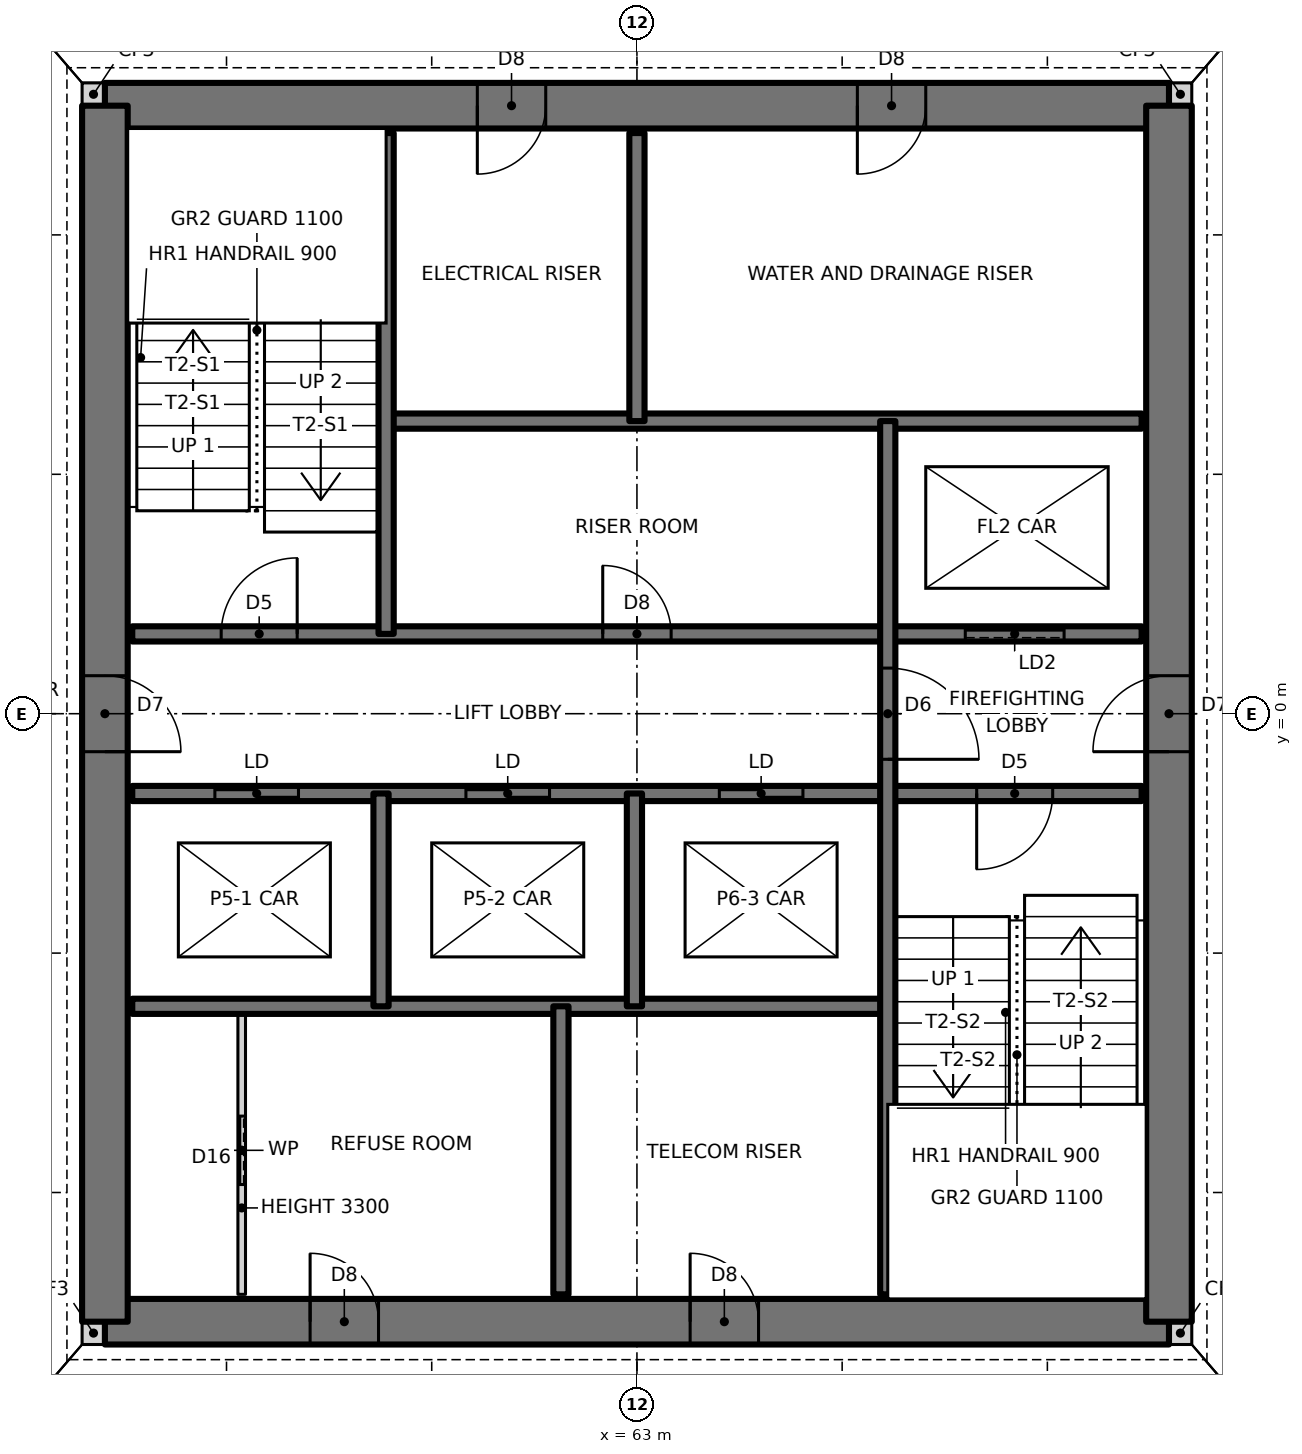
"""IFC4 building model, lengths in metres.
Left out: names, types, materials, properties, quantities, classifications, styles, units other than length and angle.
Written with IfcOpenShell. Run it as: python <this file> out.ifc"""

import sys

from ifc_helpers import new_model, si_unit, direction, frame, frame_2d, origin, place, context, subcontext, project, spatial, rectangle, extrude, element, fill, save


model = new_model("IFC4")
c1 = context("Model", 3, precision=1e-05, world=origin(), true_north=direction((0.0, 1.0)))
c2 = subcontext(c1, "Body", "Model", "MODEL_VIEW")
j1 = project(units=[si_unit("LENGTHUNIT", "METRE"), si_unit("PLANEANGLEUNIT", "RADIAN")], contexts=[c1])
p1 = place(None, origin())
s1 = spatial("IfcSite", under=j1, at=p1, CompositionType="ELEMENT")
p2 = place(p1, origin())
s2 = spatial("IfcBuilding", under=s1, at=p2, CompositionType="ELEMENT")
p3 = place(p2, frame((0.0, 0.0, 64.0)))
s3 = spatial("IfcBuildingStorey", under=s2, at=p3, CompositionType="ELEMENT", Elevation=64.0)
for number, where, z_axis, x_axis in (
    (1, (55.7, -8.15, 0.0), (0.0, 0.0, 1.0), (1.0, 0.0, 0.0)),
    (2, (70.0, -8.15, 0.0), (0.0, 0.0, 1.0), (1.0, 0.0, 0.0)),
    (3, (70.0, 8.15, 0.0), (0.0, 0.0, 1.0), (1.0, 0.0, 0.0)),
    (4, (55.7, 8.15, 0.0), (0.0, 0.0, 1.0), (1.0, 0.0, 0.0)),
):
    element("IfcWall", number, at=place(p3, frame(where, z_axis=z_axis, x_axis=x_axis)), inside=s3, PredefinedType="SOLIDWALL", context=c2, shape_type="SweptSolid", body=[
        extrude(rectangle(XDim=0.3, YDim=0.3, at=frame_2d((0.15, 0.0))), origin(), (0.0, 0.0, 1.0), 3.5),
    ])
p4 = place(p3, frame((56.0, -8.0, 0.0), z_axis=(0.0, 0.0, 1.0), x_axis=(1.0, 0.0, 0.0)))
e5 = element("IfcWall", 5, at=p4, inside=s3, PredefinedType="SHEAR", context=c2, shape_type="SweptSolid", body=[
    extrude(rectangle(XDim=14.0, YDim=0.6, at=frame_2d((7.0, 0.0))), origin(), (0.0, 0.0, 1.0), 3.5),
])
p5 = place(p4, frame((2.7, 0.0, 0.0)))
e6 = element("IfcOpeningElement", 6, at=p5, cuts=e5, PredefinedType="OPENING", context=c2, shape_type="SweptSolid", body=[
    extrude(rectangle(XDim=0.9, YDim=2.1, at=frame_2d((0.45, 1.05))), frame((0.0, 0.31, 0.0), z_axis=(0.0, -1.0, 0.0), x_axis=(1.0, 0.0, 0.0)), (0.0, 0.0, 1.0), 0.62),
])
p6 = place(p4, frame((7.7, 0.0, 0.0)))
e7 = element("IfcOpeningElement", 7, at=p6, cuts=e5, PredefinedType="OPENING", context=c2, shape_type="SweptSolid", body=[
    extrude(rectangle(XDim=0.9, YDim=2.1, at=frame_2d((0.45, 1.05))), frame((0.0, 0.31, 0.0), z_axis=(0.0, -1.0, 0.0), x_axis=(1.0, 0.0, 0.0)), (0.0, 0.0, 1.0), 0.62),
])
p7 = place(p3, frame((70.0, 8.0, 0.0), z_axis=(0.0, 0.0, 1.0), x_axis=(-1.0, 0.0, 0.0)))
e8 = element("IfcWall", 8, at=p7, inside=s3, PredefinedType="SHEAR", context=c2, shape_type="SweptSolid", body=[
    extrude(rectangle(XDim=14.0, YDim=0.6, at=frame_2d((7.0, 0.0))), origin(), (0.0, 0.0, 1.0), 3.5),
])
p8 = place(p7, frame((8.2, 0.0, 0.0)))
e9 = element("IfcOpeningElement", 9, at=p8, cuts=e8, PredefinedType="OPENING", context=c2, shape_type="SweptSolid", body=[
    extrude(rectangle(XDim=0.9, YDim=2.1, at=frame_2d((0.45, 1.05))), frame((0.0, 0.31, 0.0), z_axis=(0.0, -1.0, 0.0), x_axis=(1.0, 0.0, 0.0)), (0.0, 0.0, 1.0), 0.62),
])
p9 = place(p7, frame((3.2, 0.0, 0.0)))
e10 = element("IfcOpeningElement", 10, at=p9, cuts=e8, PredefinedType="OPENING", context=c2, shape_type="SweptSolid", body=[
    extrude(rectangle(XDim=0.9, YDim=2.1, at=frame_2d((0.45, 1.05))), frame((0.0, 0.31, 0.0), z_axis=(0.0, -1.0, 0.0), x_axis=(1.0, 0.0, 0.0)), (0.0, 0.0, 1.0), 0.62),
])
p10 = place(p3, frame((70.0, -8.0, 0.0), z_axis=(0.0, 0.0, 1.0), x_axis=(0.0, 1.0, 0.0)))
e11 = element("IfcWall", 11, at=p10, inside=s3, PredefinedType="SHEAR", context=c2, shape_type="SweptSolid", body=[
    extrude(rectangle(XDim=16.0, YDim=0.6, at=frame_2d((8.0, 0.0))), origin(), (0.0, 0.0, 1.0), 3.5),
])
p11 = place(p10, frame((7.5, 0.0, 0.0)))
e12 = element("IfcOpeningElement", 12, at=p11, cuts=e11, PredefinedType="OPENING", context=c2, shape_type="SweptSolid", body=[
    extrude(rectangle(XDim=1.0, YDim=2.1, at=frame_2d((0.5, 1.05))), frame((0.0, 0.31, 0.0), z_axis=(0.0, -1.0, 0.0), x_axis=(1.0, 0.0, 0.0)), (0.0, 0.0, 1.0), 0.62),
])
p12 = place(p3, frame((56.0, 8.0, 0.0), z_axis=(0.0, 0.0, 1.0), x_axis=(0.0, -1.0, 0.0)))
e13 = element("IfcWall", 13, at=p12, inside=s3, PredefinedType="SHEAR", context=c2, shape_type="SweptSolid", body=[
    extrude(rectangle(XDim=16.0, YDim=0.6, at=frame_2d((8.0, 0.0))), origin(), (0.0, 0.0, 1.0), 3.5),
])
p13 = place(p12, frame((7.5, 0.0, 0.0)))
e14 = element("IfcOpeningElement", 14, at=p13, cuts=e13, PredefinedType="OPENING", context=c2, shape_type="SweptSolid", body=[
    extrude(rectangle(XDim=1.0, YDim=2.1, at=frame_2d((0.5, 1.05))), frame((0.0, 0.31, 0.0), z_axis=(0.0, -1.0, 0.0), x_axis=(1.0, 0.0, 0.0)), (0.0, 0.0, 1.0), 0.62),
])
p14 = place(p3, frame((56.36, -3.85, 0.0), z_axis=(0.0, 0.0, 1.0), x_axis=(1.0, 0.0, 0.0)))
e15 = element("IfcWall", 15, at=p14, inside=s3, PredefinedType="SOLIDWALL", context=c2, shape_type="SweptSolid", body=[
    extrude(rectangle(XDim=9.94, YDim=0.2, at=frame_2d((4.97, 0.0))), origin(), (0.0, 0.0, 1.0), 3.5),
])
p15 = place(p3, frame((56.36, -1.05, 0.0), z_axis=(0.0, 0.0, 1.0), x_axis=(1.0, 0.0, 0.0)))
e16 = element("IfcWall", 16, at=p15, inside=s3, PredefinedType="SOLIDWALL", context=c2, shape_type="SweptSolid", body=[
    extrude(rectangle(XDim=13.28, YDim=0.2, at=frame_2d((6.64, 0.0))), origin(), (0.0, 0.0, 1.0), 3.5),
])
p16 = place(p15, frame((11.11, 0.0, 0.0)))
e17 = element("IfcOpeningElement", 17, at=p16, cuts=e16, PredefinedType="OPENING", context=c2, shape_type="SweptSolid", body=[
    extrude(rectangle(XDim=1.0, YDim=2.1, at=frame_2d((0.5, 1.05))), frame((0.0, 0.11, 0.0), z_axis=(0.0, -1.0, 0.0), x_axis=(1.0, 0.0, 0.0)), (0.0, 0.0, 1.0), 0.22),
])
p17 = place(p15, frame((1.087, 0.0, 0.0)))
e18 = element("IfcOpeningElement", 18, at=p17, cuts=e16, PredefinedType="OPENING", context=c2, shape_type="SweptSolid", body=[
    extrude(rectangle(XDim=1.1, YDim=2.1, at=frame_2d((0.55, 1.05))), frame((0.0, 0.11, 0.0), z_axis=(0.0, -1.0, 0.0), x_axis=(1.0, 0.0, 0.0)), (0.0, 0.0, 1.0), 0.22),
])
p18 = place(p15, frame((4.39, 0.0, 0.0)))
e19 = element("IfcOpeningElement", 19, at=p18, cuts=e16, PredefinedType="OPENING", context=c2, shape_type="SweptSolid", body=[
    extrude(rectangle(XDim=1.1, YDim=2.1, at=frame_2d((0.55, 1.05))), frame((0.0, 0.11, 0.0), z_axis=(0.0, -1.0, 0.0), x_axis=(1.0, 0.0, 0.0)), (0.0, 0.0, 1.0), 0.22),
])
p19 = place(p15, frame((7.724, 0.0, 0.0)))
e20 = element("IfcOpeningElement", 20, at=p19, cuts=e16, PredefinedType="OPENING", context=c2, shape_type="SweptSolid", body=[
    extrude(rectangle(XDim=1.1, YDim=2.1, at=frame_2d((0.55, 1.05))), frame((0.0, 0.11, 0.0), z_axis=(0.0, -1.0, 0.0), x_axis=(1.0, 0.0, 0.0)), (0.0, 0.0, 1.0), 0.22),
])
p20 = place(p3, frame((56.36, 1.05, 0.0), z_axis=(0.0, 0.0, 1.0), x_axis=(1.0, 0.0, 0.0)))
e21 = element("IfcWall", 21, at=p20, inside=s3, PredefinedType="SOLIDWALL", context=c2, shape_type="SweptSolid", body=[
    extrude(rectangle(XDim=13.28, YDim=0.2, at=frame_2d((6.64, 0.0))), origin(), (0.0, 0.0, 1.0), 3.5),
])
p21 = place(p20, frame((1.17, 0.0, 0.0)))
e22 = element("IfcOpeningElement", 22, at=p21, cuts=e21, PredefinedType="OPENING", context=c2, shape_type="SweptSolid", body=[
    extrude(rectangle(XDim=1.0, YDim=2.1, at=frame_2d((0.5, 1.05))), frame((0.0, 0.11, 0.0), z_axis=(0.0, -1.0, 0.0), x_axis=(1.0, 0.0, 0.0)), (0.0, 0.0, 1.0), 0.22),
])
p22 = place(p20, frame((6.19, 0.0, 0.0)))
e23 = element("IfcOpeningElement", 23, at=p22, cuts=e21, PredefinedType="OPENING", context=c2, shape_type="SweptSolid", body=[
    extrude(rectangle(XDim=0.9, YDim=2.1, at=frame_2d((0.45, 1.05))), frame((0.0, 0.11, 0.0), z_axis=(0.0, -1.0, 0.0), x_axis=(1.0, 0.0, 0.0)), (0.0, 0.0, 1.0), 0.22),
])
p23 = place(p20, frame((10.96, 0.0, 0.0)))
e24 = element("IfcOpeningElement", 24, at=p23, cuts=e21, PredefinedType="OPENING", context=c2, shape_type="SweptSolid", body=[
    extrude(rectangle(XDim=1.3, YDim=2.1, at=frame_2d((0.65, 1.05))), frame((0.0, 0.11, 0.0), z_axis=(0.0, -1.0, 0.0), x_axis=(1.0, 0.0, 0.0)), (0.0, 0.0, 1.0), 0.22),
])
p24 = place(p3, frame((59.7, 3.85, 0.0), z_axis=(0.0, 0.0, 1.0), x_axis=(1.0, 0.0, 0.0)))
e25 = element("IfcWall", 25, at=p24, inside=s3, PredefinedType="SOLIDWALL", context=c2, shape_type="SweptSolid", body=[
    extrude(rectangle(XDim=9.94, YDim=0.2, at=frame_2d((4.97, 0.0))), origin(), (0.0, 0.0, 1.0), 3.5),
])
p25 = place(p3, frame((66.3, -7.64, 0.0), z_axis=(0.0, 0.0, 1.0), x_axis=(0.0, 1.0, 0.0)))
e26 = element("IfcWall", 26, at=p25, inside=s3, PredefinedType="SOLIDWALL", context=c2, shape_type="SweptSolid", body=[
    extrude(rectangle(XDim=11.49, YDim=0.2, at=frame_2d((5.745, 0.0))), origin(), (0.0, 0.0, 1.0), 3.5),
])
p26 = place(p25, frame((7.04, 0.0, 0.0)))
e27 = element("IfcOpeningElement", 27, at=p26, cuts=e26, PredefinedType="OPENING", context=c2, shape_type="SweptSolid", body=[
    extrude(rectangle(XDim=1.2, YDim=2.1, at=frame_2d((0.6, 1.05))), frame((0.0, 0.11, 0.0), z_axis=(0.0, -1.0, 0.0), x_axis=(1.0, 0.0, 0.0)), (0.0, 0.0, 1.0), 0.22),
])
p27 = place(p3, frame((63.0, 3.85, 0.0), z_axis=(0.0, 0.0, 1.0), x_axis=(0.0, 1.0, 0.0)))
e28 = element("IfcWall", 28, at=p27, inside=s3, PredefinedType="SOLIDWALL", context=c2, shape_type="SweptSolid", body=[
    extrude(rectangle(XDim=3.79, YDim=0.2, at=frame_2d((1.895, 0.0))), origin(), (0.0, 0.0, 1.0), 3.5),
])
p28 = place(p3, frame((62.967, -3.85, 0.0), z_axis=(0.0, 0.0, 1.0), x_axis=(0.0, 1.0, 0.0)))
e29 = element("IfcWall", 29, at=p28, inside=s3, PredefinedType="SOLIDWALL", context=c2, shape_type="SweptSolid", body=[
    extrude(rectangle(XDim=2.8, YDim=0.2, at=frame_2d((1.4, 0.0))), origin(), (0.0, 0.0, 1.0), 3.5),
])
p29 = place(p3, frame((62.0, -7.64, 0.0), z_axis=(0.0, 0.0, 1.0), x_axis=(0.0, 1.0, 0.0)))
e30 = element("IfcWall", 30, at=p29, inside=s3, PredefinedType="SOLIDWALL", context=c2, shape_type="SweptSolid", body=[
    extrude(rectangle(XDim=3.79, YDim=0.2, at=frame_2d((1.895, 0.0))), origin(), (0.0, 0.0, 1.0), 3.5),
])
p30 = place(p3, frame((59.7, 1.05, 0.0), z_axis=(0.0, 0.0, 1.0), x_axis=(0.0, 1.0, 0.0)))
e31 = element("IfcWall", 31, at=p30, inside=s3, PredefinedType="SOLIDWALL", context=c2, shape_type="SweptSolid", body=[
    extrude(rectangle(XDim=6.59, YDim=0.2, at=frame_2d((3.295, 0.0))), origin(), (0.0, 0.0, 1.0), 3.5),
])
p31 = place(p3, frame((59.633, -3.85, 0.0), z_axis=(0.0, 0.0, 1.0), x_axis=(0.0, 1.0, 0.0)))
e32 = element("IfcWall", 32, at=p31, inside=s3, PredefinedType="SOLIDWALL", context=c2, shape_type="SweptSolid", body=[
    extrude(rectangle(XDim=2.8, YDim=0.2, at=frame_2d((1.4, 0.0))), origin(), (0.0, 0.0, 1.0), 3.5),
])
p32 = place(p3, frame((57.8, -7.64, 0.0), z_axis=(0.0, 0.0, 1.0), x_axis=(0.0, 1.0, 0.0)))
e33 = element("IfcWall", 33, at=p32, inside=s3, PredefinedType="PARTITIONING", context=c2, shape_type="SweptSolid", body=[
    extrude(rectangle(XDim=3.79, YDim=0.1, at=frame_2d((1.895, 0.0))), origin(), (0.0, 0.0, 1.0), 3.3),
])
p33 = place(p32, frame((1.445, 0.0, 0.0)))
e34 = element("IfcOpeningElement", 34, at=p33, cuts=e33, PredefinedType="OPENING", context=c2, shape_type="SweptSolid", body=[
    extrude(rectangle(XDim=0.9, YDim=2.1, at=frame_2d((0.45, 1.05))), frame((0.0, 0.06, 0.0), z_axis=(0.0, -1.0, 0.0), x_axis=(1.0, 0.0, 0.0)), (0.0, 0.0, 1.0), 0.12),
])
p34 = place(p21, origin())
e35 = element("IfcDoor", 35, at=p34, inside=s3, OperationType="SINGLE_SWING_RIGHT", PredefinedType="DOOR", context=c2, shape_type="SweptSolid", body=[
    extrude(rectangle(XDim=1.0, YDim=2.1, at=frame_2d((0.5, 1.05))), frame((0.0, 0.025, 0.0), z_axis=(0.0, -1.0, 0.0), x_axis=(1.0, 0.0, 0.0)), (0.0, 0.0, 1.0), 0.05),
])
fill(e22, e35)
p35 = place(p16, frame((1.0, 0.0, 0.0), z_axis=(0.0, 0.0, 1.0), x_axis=(-1.0, 0.0, 0.0)))
e36 = element("IfcDoor", 36, at=p35, inside=s3, OperationType="SINGLE_SWING_RIGHT", PredefinedType="DOOR", context=c2, shape_type="SweptSolid", body=[
    extrude(rectangle(XDim=1.0, YDim=2.1, at=frame_2d((0.5, 1.05))), frame((0.0, 0.025, 0.0), z_axis=(0.0, -1.0, 0.0), x_axis=(1.0, 0.0, 0.0)), (0.0, 0.0, 1.0), 0.05),
])
fill(e17, e36)
p36 = place(p26, frame((1.2, 0.0, 0.0), z_axis=(0.0, 0.0, 1.0), x_axis=(-1.0, 0.0, 0.0)))
e37 = element("IfcDoor", 37, at=p36, inside=s3, OperationType="SINGLE_SWING_RIGHT", PredefinedType="DOOR", context=c2, shape_type="SweptSolid", body=[
    extrude(rectangle(XDim=1.2, YDim=2.1, at=frame_2d((0.6, 1.05))), frame((0.0, 0.025, 0.0), z_axis=(0.0, -1.0, 0.0), x_axis=(1.0, 0.0, 0.0)), (0.0, 0.0, 1.0), 0.05),
])
fill(e27, e37)
p37 = place(p22, origin())
e38 = element("IfcDoor", 38, at=p37, inside=s3, OperationType="SINGLE_SWING_LEFT", PredefinedType="DOOR", context=c2, shape_type="SweptSolid", body=[
    extrude(rectangle(XDim=0.9, YDim=2.1, at=frame_2d((0.45, 1.05))), frame((0.0, 0.025, 0.0), z_axis=(0.0, -1.0, 0.0), x_axis=(1.0, 0.0, 0.0)), (0.0, 0.0, 1.0), 0.05),
])
fill(e23, e38)
p38 = place(p33, origin())
e39 = element("IfcDoor", 39, at=p38, inside=s3, OperationType="SLIDING_TO_LEFT", PredefinedType="DOOR", context=c2, shape_type="SweptSolid", body=[
    extrude(rectangle(XDim=0.9, YDim=2.1, at=frame_2d((0.45, 1.05))), frame((0.0, 0.025, 0.0), z_axis=(0.0, -1.0, 0.0), x_axis=(1.0, 0.0, 0.0)), (0.0, 0.0, 1.0), 0.05),
])
fill(e34, e39)
p39 = place(p13, origin())
e40 = element("IfcDoor", 40, at=p39, inside=s3, OperationType="SINGLE_SWING_RIGHT", PredefinedType="DOOR", context=c2, shape_type="SweptSolid", body=[
    extrude(rectangle(XDim=1.0, YDim=2.1, at=frame_2d((0.5, 1.05))), frame((0.0, 0.025, 0.0), z_axis=(0.0, -1.0, 0.0), x_axis=(1.0, 0.0, 0.0)), (0.0, 0.0, 1.0), 0.05),
])
fill(e14, e40)
p40 = place(p11, origin())
e41 = element("IfcDoor", 41, at=p40, inside=s3, OperationType="SINGLE_SWING_LEFT", PredefinedType="DOOR", context=c2, shape_type="SweptSolid", body=[
    extrude(rectangle(XDim=1.0, YDim=2.1, at=frame_2d((0.5, 1.05))), frame((0.0, 0.025, 0.0), z_axis=(0.0, -1.0, 0.0), x_axis=(1.0, 0.0, 0.0)), (0.0, 0.0, 1.0), 0.05),
])
fill(e12, e41)
p41 = place(p8, origin())
e42 = element("IfcDoor", 42, at=p41, inside=s3, OperationType="SINGLE_SWING_RIGHT", PredefinedType="DOOR", context=c2, shape_type="SweptSolid", body=[
    extrude(rectangle(XDim=0.9, YDim=2.1, at=frame_2d((0.45, 1.05))), frame((0.0, 0.025, 0.0), z_axis=(0.0, -1.0, 0.0), x_axis=(1.0, 0.0, 0.0)), (0.0, 0.0, 1.0), 0.05),
])
fill(e9, e42)
p42 = place(p9, origin())
e43 = element("IfcDoor", 43, at=p42, inside=s3, OperationType="SINGLE_SWING_RIGHT", PredefinedType="DOOR", context=c2, shape_type="SweptSolid", body=[
    extrude(rectangle(XDim=0.9, YDim=2.1, at=frame_2d((0.45, 1.05))), frame((0.0, 0.025, 0.0), z_axis=(0.0, -1.0, 0.0), x_axis=(1.0, 0.0, 0.0)), (0.0, 0.0, 1.0), 0.05),
])
fill(e10, e43)
p43 = place(p5, origin())
e44 = element("IfcDoor", 44, at=p43, inside=s3, OperationType="SINGLE_SWING_LEFT", PredefinedType="DOOR", context=c2, shape_type="SweptSolid", body=[
    extrude(rectangle(XDim=0.9, YDim=2.1, at=frame_2d((0.45, 1.05))), frame((0.0, 0.025, 0.0), z_axis=(0.0, -1.0, 0.0), x_axis=(1.0, 0.0, 0.0)), (0.0, 0.0, 1.0), 0.05),
])
fill(e6, e44)
p44 = place(p6, origin())
e45 = element("IfcDoor", 45, at=p44, inside=s3, OperationType="SINGLE_SWING_LEFT", PredefinedType="DOOR", context=c2, shape_type="SweptSolid", body=[
    extrude(rectangle(XDim=0.9, YDim=2.1, at=frame_2d((0.45, 1.05))), frame((0.0, 0.025, 0.0), z_axis=(0.0, -1.0, 0.0), x_axis=(1.0, 0.0, 0.0)), (0.0, 0.0, 1.0), 0.05),
])
fill(e7, e45)
p45 = place(p17, origin())
e46 = element("IfcDoor", 46, at=p45, inside=s3, OperationType="DOUBLE_DOOR_SLIDING", PredefinedType="DOOR", context=c2, shape_type="SweptSolid", body=[
    extrude(rectangle(XDim=1.1, YDim=2.1, at=frame_2d((0.55, 1.05))), frame((0.0, 0.025, 0.0), z_axis=(0.0, -1.0, 0.0), x_axis=(1.0, 0.0, 0.0)), (0.0, 0.0, 1.0), 0.05),
])
fill(e18, e46)
p46 = place(p18, origin())
e47 = element("IfcDoor", 47, at=p46, inside=s3, OperationType="DOUBLE_DOOR_SLIDING", PredefinedType="DOOR", context=c2, shape_type="SweptSolid", body=[
    extrude(rectangle(XDim=1.1, YDim=2.1, at=frame_2d((0.55, 1.05))), frame((0.0, 0.025, 0.0), z_axis=(0.0, -1.0, 0.0), x_axis=(1.0, 0.0, 0.0)), (0.0, 0.0, 1.0), 0.05),
])
fill(e19, e47)
p47 = place(p19, origin())
e48 = element("IfcDoor", 48, at=p47, inside=s3, OperationType="DOUBLE_DOOR_SLIDING", PredefinedType="DOOR", context=c2, shape_type="SweptSolid", body=[
    extrude(rectangle(XDim=1.1, YDim=2.1, at=frame_2d((0.55, 1.05))), frame((0.0, 0.025, 0.0), z_axis=(0.0, -1.0, 0.0), x_axis=(1.0, 0.0, 0.0)), (0.0, 0.0, 1.0), 0.05),
])
fill(e20, e48)
p48 = place(p23, origin())
e49 = element("IfcDoor", 49, at=p48, inside=s3, OperationType="SLIDING_TO_LEFT", PredefinedType="DOOR", context=c2, shape_type="SweptSolid", body=[
    extrude(rectangle(XDim=1.3, YDim=2.1, at=frame_2d((0.65, 1.05))), frame((0.0, 0.025, 0.0), z_axis=(0.0, -1.0, 0.0), x_axis=(1.0, 0.0, 0.0)), (0.0, 0.0, 1.0), 0.05),
])
fill(e24, e49)
save(model, sys.argv[1])
